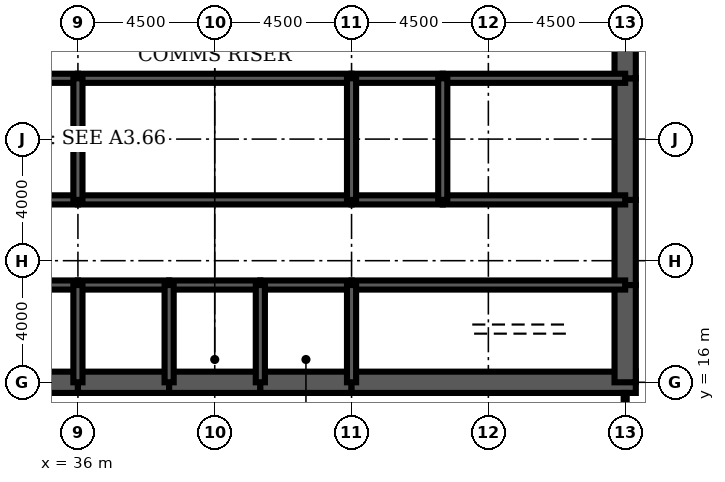
"""IFC4 building model, lengths in metres.
Left out: names, types, materials, properties, quantities, classifications, styles, units other than length and angle.
Written with IfcOpenShell. Run it as: python <this file> out.ifc"""

import sys

from ifc_helpers import new_model, si_unit, direction, frame, frame_2d, origin, place, context, subcontext, project, spatial, rectangle, extrude, element, fill, save


model = new_model("IFC4")
c1 = context("Model", 3, precision=1e-05, world=origin(), true_north=direction((0.0, 1.0)))
c2 = subcontext(c1, "Body", "Model", "MODEL_VIEW")
j1 = project(units=[si_unit("LENGTHUNIT", "METRE"), si_unit("PLANEANGLEUNIT", "RADIAN")], contexts=[c1])
p1 = place(None, origin())
s1 = spatial("IfcSite", under=j1, at=p1, CompositionType="ELEMENT")
p2 = place(p1, origin())
s2 = spatial("IfcBuilding", under=s1, at=p2, CompositionType="ELEMENT")
p3 = place(p2, frame((0.0, 0.0, 283.7)))
s3 = spatial("IfcBuildingStorey", under=s2, at=p3, CompositionType="ELEMENT", Elevation=283.7)
for number, where, z_axis, x_axis in (
    (1, (33.0, 16.0, 0.0), (0.0, 0.0, 1.0), (1.0, 0.0, 0.0)),
    (2, (36.0, 16.0, 0.0), (0.0, 0.0, 1.0), (1.0, 0.0, 0.0)),
    (3, (39.0, 16.0, 0.0), (0.0, 0.0, 1.0), (1.0, 0.0, 0.0)),
    (4, (42.0, 16.0, 0.0), (0.0, 0.0, 1.0), (1.0, 0.0, 0.0)),
):
    element("IfcWall", number, at=place(p3, frame(where, z_axis=z_axis, x_axis=x_axis)), inside=s3, PredefinedType="SHEAR", context=c2, shape_type="SweptSolid", body=[
        extrude(rectangle(XDim=3.0, YDim=0.7, at=frame_2d((1.5, 0.0))), origin(), (0.0, 0.0, 1.0), 4.2),
    ])
p4 = place(p3, frame((45.0, 16.0, 0.0), z_axis=(0.0, 0.0, 1.0), x_axis=(1.0, 0.0, 0.0)))
e5 = element("IfcWall", 5, at=p4, inside=s3, PredefinedType="SHEAR", context=c2, shape_type="SweptSolid", body=[
    extrude(rectangle(XDim=9.35, YDim=0.7, at=frame_2d((4.675, 0.0))), origin(), (0.0, 0.0, 1.0), 4.2),
])
p5 = place(p3, frame((54.0, 16.0, 0.0), z_axis=(0.0, 0.0, 1.0), x_axis=(0.0, 1.0, 0.0)))
e6 = element("IfcWall", 6, at=p5, inside=s3, PredefinedType="SHEAR", context=c2, shape_type="SweptSolid", body=[
    extrude(rectangle(XDim=3.2, YDim=0.7, at=frame_2d((1.6, 0.0))), origin(), (0.0, 0.0, 1.0), 4.2),
])
p6 = place(p3, frame((54.0, 19.2, 0.0), z_axis=(0.0, 0.0, 1.0), x_axis=(0.0, 1.0, 0.0)))
e7 = element("IfcWall", 7, at=p6, inside=s3, PredefinedType="SHEAR", context=c2, shape_type="SweptSolid", body=[
    extrude(rectangle(XDim=2.8, YDim=0.7, at=frame_2d((1.4, 0.0))), origin(), (0.0, 0.0, 1.0), 4.2),
])
p7 = place(p6, frame((0.4, 0.0, 0.0)))
e8 = element("IfcOpeningElement", 8, at=p7, cuts=e7, PredefinedType="OPENING", context=c2, shape_type="SweptSolid", body=[
    extrude(rectangle(XDim=1.8, YDim=2.1, at=frame_2d((0.9, 1.05))), frame((0.0, 0.36, 0.0), z_axis=(0.0, -1.0, 0.0), x_axis=(1.0, 0.0, 0.0)), (0.0, 0.0, 1.0), 0.72),
])
p8 = place(p3, frame((54.0, 22.0, 0.0), z_axis=(0.0, 0.0, 1.0), x_axis=(0.0, 1.0, 0.0)))
e9 = element("IfcWall", 9, at=p8, inside=s3, PredefinedType="SHEAR", context=c2, shape_type="SweptSolid", body=[
    extrude(rectangle(XDim=4.0, YDim=0.7, at=frame_2d((2.0, 0.0))), origin(), (0.0, 0.0, 1.0), 4.2),
])
p9 = place(p3, frame((54.0, 26.0, 0.0), z_axis=(0.0, 0.0, 1.0), x_axis=(0.0, 1.0, 0.0)))
e10 = element("IfcWall", 10, at=p9, inside=s3, PredefinedType="SHEAR", context=c2, shape_type="SweptSolid", body=[
    extrude(rectangle(XDim=2.8, YDim=0.7, at=frame_2d((1.4, 0.0))), origin(), (0.0, 0.0, 1.0), 4.2),
])
p10 = place(p9, frame((0.6, 0.0, 0.0)))
e11 = element("IfcOpeningElement", 11, at=p10, cuts=e10, PredefinedType="OPENING", context=c2, shape_type="SweptSolid", body=[
    extrude(rectangle(XDim=1.8, YDim=2.1, at=frame_2d((0.9, 1.05))), frame((0.0, 0.36, 0.0), z_axis=(0.0, -1.0, 0.0), x_axis=(1.0, 0.0, 0.0)), (0.0, 0.0, 1.0), 0.72),
])
p11 = place(p3, frame((33.0, 19.2, 0.0), z_axis=(0.0, 0.0, 1.0), x_axis=(1.0, 0.0, 0.0)))
e12 = element("IfcWall", 12, at=p11, inside=s3, PredefinedType="SOLIDWALL", context=c2, shape_type="SweptSolid", body=[
    extrude(rectangle(XDim=3.0, YDim=0.3, at=frame_2d((1.5, 0.0))), origin(), (0.0, 0.0, 1.0), 4.2),
])
p12 = place(p11, frame((0.95, 0.0, 0.0)))
e13 = element("IfcOpeningElement", 13, at=p12, cuts=e12, PredefinedType="OPENING", context=c2, shape_type="SweptSolid", body=[
    extrude(rectangle(XDim=1.1, YDim=2.2, at=frame_2d((0.55, 1.1))), frame((0.0, 0.16, 0.0), z_axis=(0.0, -1.0, 0.0), x_axis=(1.0, 0.0, 0.0)), (0.0, 0.0, 1.0), 0.32),
])
p13 = place(p3, frame((36.0, 19.2, 0.0), z_axis=(0.0, 0.0, 1.0), x_axis=(1.0, 0.0, 0.0)))
e14 = element("IfcWall", 14, at=p13, inside=s3, PredefinedType="SOLIDWALL", context=c2, shape_type="SweptSolid", body=[
    extrude(rectangle(XDim=3.0, YDim=0.3, at=frame_2d((1.5, 0.0))), origin(), (0.0, 0.0, 1.0), 4.2),
])
p14 = place(p13, frame((0.95, 0.0, 0.0)))
e15 = element("IfcOpeningElement", 15, at=p14, cuts=e14, PredefinedType="OPENING", context=c2, shape_type="SweptSolid", body=[
    extrude(rectangle(XDim=1.1, YDim=2.2, at=frame_2d((0.55, 1.1))), frame((0.0, 0.16, 0.0), z_axis=(0.0, -1.0, 0.0), x_axis=(1.0, 0.0, 0.0)), (0.0, 0.0, 1.0), 0.32),
])
p15 = place(p3, frame((39.0, 19.2, 0.0), z_axis=(0.0, 0.0, 1.0), x_axis=(1.0, 0.0, 0.0)))
e16 = element("IfcWall", 16, at=p15, inside=s3, PredefinedType="SOLIDWALL", context=c2, shape_type="SweptSolid", body=[
    extrude(rectangle(XDim=3.0, YDim=0.3, at=frame_2d((1.5, 0.0))), origin(), (0.0, 0.0, 1.0), 4.2),
])
p16 = place(p15, frame((1.0, 0.0, 0.0)))
e17 = element("IfcOpeningElement", 17, at=p16, cuts=e16, PredefinedType="OPENING", context=c2, shape_type="SweptSolid", body=[
    extrude(rectangle(XDim=1.0, YDim=2.1, at=frame_2d((0.5, 1.05))), frame((0.0, 0.16, 0.0), z_axis=(0.0, -1.0, 0.0), x_axis=(1.0, 0.0, 0.0)), (0.0, 0.0, 1.0), 0.32),
])
p17 = place(p3, frame((42.0, 19.2, 0.0), z_axis=(0.0, 0.0, 1.0), x_axis=(1.0, 0.0, 0.0)))
e18 = element("IfcWall", 18, at=p17, inside=s3, PredefinedType="SOLIDWALL", context=c2, shape_type="SweptSolid", body=[
    extrude(rectangle(XDim=3.0, YDim=0.3, at=frame_2d((1.5, 0.0))), origin(), (0.0, 0.0, 1.0), 4.2),
])
p18 = place(p17, frame((1.0, 0.0, 0.0)))
e19 = element("IfcOpeningElement", 19, at=p18, cuts=e18, PredefinedType="OPENING", context=c2, shape_type="SweptSolid", body=[
    extrude(rectangle(XDim=1.0, YDim=2.1, at=frame_2d((0.5, 1.05))), frame((0.0, 0.16, 0.0), z_axis=(0.0, -1.0, 0.0), x_axis=(1.0, 0.0, 0.0)), (0.0, 0.0, 1.0), 0.32),
])
p19 = place(p3, frame((45.0, 19.2, 0.0), z_axis=(0.0, 0.0, 1.0), x_axis=(1.0, 0.0, 0.0)))
e20 = element("IfcWall", 20, at=p19, inside=s3, PredefinedType="SOLIDWALL", context=c2, shape_type="SweptSolid", body=[
    extrude(rectangle(XDim=9.0, YDim=0.3, at=frame_2d((4.5, 0.0))), origin(), (0.0, 0.0, 1.0), 4.2),
])
p20 = place(p19, frame((7.35, 0.0, 0.0)))
e21 = element("IfcOpeningElement", 21, at=p20, cuts=e20, PredefinedType="OPENING", context=c2, shape_type="SweptSolid", body=[
    extrude(rectangle(XDim=1.0, YDim=2.1, at=frame_2d((0.5, 1.05))), frame((0.0, 0.16, 0.0), z_axis=(0.0, -1.0, 0.0), x_axis=(1.0, 0.0, 0.0)), (0.0, 0.0, 1.0), 0.32),
])
p21 = place(p3, frame((27.0, 22.0, 0.0), z_axis=(0.0, 0.0, 1.0), x_axis=(1.0, 0.0, 0.0)))
e22 = element("IfcWall", 22, at=p21, inside=s3, PredefinedType="SOLIDWALL", context=c2, shape_type="SweptSolid", body=[
    extrude(rectangle(XDim=9.0, YDim=0.3, at=frame_2d((4.5, 0.0))), origin(), (0.0, 0.0, 1.0), 4.2),
])
p22 = place(p21, frame((4.0, 0.0, 0.0)))
e23 = element("IfcOpeningElement", 23, at=p22, cuts=e22, PredefinedType="OPENING", context=c2, shape_type="SweptSolid", body=[
    extrude(rectangle(XDim=1.0, YDim=2.1, at=frame_2d((0.5, 1.05))), frame((0.0, 0.16, 0.0), z_axis=(0.0, -1.0, 0.0), x_axis=(1.0, 0.0, 0.0)), (0.0, 0.0, 1.0), 0.32),
])
p23 = place(p3, frame((36.0, 22.0, 0.0), z_axis=(0.0, 0.0, 1.0), x_axis=(1.0, 0.0, 0.0)))
e24 = element("IfcWall", 24, at=p23, inside=s3, PredefinedType="SOLIDWALL", context=c2, shape_type="SweptSolid", body=[
    extrude(rectangle(XDim=9.0, YDim=0.3, at=frame_2d((4.5, 0.0))), origin(), (0.0, 0.0, 1.0), 4.2),
])
p24 = place(p23, frame((4.0, 0.0, 0.0)))
e25 = element("IfcOpeningElement", 25, at=p24, cuts=e24, PredefinedType="OPENING", context=c2, shape_type="SweptSolid", body=[
    extrude(rectangle(XDim=1.0, YDim=2.1, at=frame_2d((0.5, 1.05))), frame((0.0, 0.16, 0.0), z_axis=(0.0, -1.0, 0.0), x_axis=(1.0, 0.0, 0.0)), (0.0, 0.0, 1.0), 0.32),
])
p25 = place(p3, frame((45.0, 22.0, 0.0), z_axis=(0.0, 0.0, 1.0), x_axis=(1.0, 0.0, 0.0)))
e26 = element("IfcWall", 26, at=p25, inside=s3, PredefinedType="SOLIDWALL", context=c2, shape_type="SweptSolid", body=[
    extrude(rectangle(XDim=3.0, YDim=0.3, at=frame_2d((1.5, 0.0))), origin(), (0.0, 0.0, 1.0), 4.2),
])
p26 = place(p25, frame((1.0, 0.0, 0.0)))
e27 = element("IfcOpeningElement", 27, at=p26, cuts=e26, PredefinedType="OPENING", context=c2, shape_type="SweptSolid", body=[
    extrude(rectangle(XDim=1.0, YDim=2.1, at=frame_2d((0.5, 1.05))), frame((0.0, 0.16, 0.0), z_axis=(0.0, -1.0, 0.0), x_axis=(1.0, 0.0, 0.0)), (0.0, 0.0, 1.0), 0.32),
])
p27 = place(p3, frame((48.0, 22.0, 0.0), z_axis=(0.0, 0.0, 1.0), x_axis=(1.0, 0.0, 0.0)))
e28 = element("IfcWall", 28, at=p27, inside=s3, PredefinedType="SOLIDWALL", context=c2, shape_type="SweptSolid", body=[
    extrude(rectangle(XDim=6.0, YDim=0.3, at=frame_2d((3.0, 0.0))), origin(), (0.0, 0.0, 1.0), 4.2),
])
p28 = place(p27, frame((2.0, 0.0, 0.0)))
e29 = element("IfcOpeningElement", 29, at=p28, cuts=e28, PredefinedType="OPENING", context=c2, shape_type="SweptSolid", body=[
    extrude(rectangle(XDim=1.0, YDim=2.1, at=frame_2d((0.5, 1.05))), frame((0.0, 0.16, 0.0), z_axis=(0.0, -1.0, 0.0), x_axis=(1.0, 0.0, 0.0)), (0.0, 0.0, 1.0), 0.32),
])
p29 = place(p27, frame((4.4, 0.0, 0.0)))
e30 = element("IfcOpeningElement", 30, at=p29, cuts=e28, PredefinedType="OPENING", context=c2, shape_type="SweptSolid", body=[
    extrude(rectangle(XDim=1.0, YDim=2.1, at=frame_2d((0.5, 1.05))), frame((0.0, 0.16, 0.0), z_axis=(0.0, -1.0, 0.0), x_axis=(1.0, 0.0, 0.0)), (0.0, 0.0, 1.0), 0.32),
])
for number, where, z_axis, x_axis in (
    (31, (27.0, 26.0, 0.0), (0.0, 0.0, 1.0), (1.0, 0.0, 0.0)),
    (32, (36.0, 26.0, 0.0), (0.0, 0.0, 1.0), (1.0, 0.0, 0.0)),
):
    element("IfcWall", number, at=place(p3, frame(where, z_axis=z_axis, x_axis=x_axis)), inside=s3, PredefinedType="SOLIDWALL", context=c2, shape_type="SweptSolid", body=[
        extrude(rectangle(XDim=9.0, YDim=0.3, at=frame_2d((4.5, 0.0))), origin(), (0.0, 0.0, 1.0), 4.2),
    ])
p30 = place(p3, frame((45.0, 26.0, 0.0), z_axis=(0.0, 0.0, 1.0), x_axis=(1.0, 0.0, 0.0)))
e33 = element("IfcWall", 33, at=p30, inside=s3, PredefinedType="SOLIDWALL", context=c2, shape_type="SweptSolid", body=[
    extrude(rectangle(XDim=3.0, YDim=0.3, at=frame_2d((1.5, 0.0))), origin(), (0.0, 0.0, 1.0), 4.2),
])
p31 = place(p3, frame((48.0, 26.0, 0.0), z_axis=(0.0, 0.0, 1.0), x_axis=(1.0, 0.0, 0.0)))
e34 = element("IfcWall", 34, at=p31, inside=s3, PredefinedType="SOLIDWALL", context=c2, shape_type="SweptSolid", body=[
    extrude(rectangle(XDim=6.0, YDim=0.3, at=frame_2d((3.0, 0.0))), origin(), (0.0, 0.0, 1.0), 4.2),
])
for number, where, z_axis, x_axis in (
    (35, (36.0, 16.0, 0.0), (0.0, 0.0, 1.0), (0.0, 1.0, 0.0)),
    (36, (39.0, 16.0, 0.0), (0.0, 0.0, 1.0), (0.0, 1.0, 0.0)),
    (37, (42.0, 16.0, 0.0), (0.0, 0.0, 1.0), (0.0, 1.0, 0.0)),
    (38, (45.0, 16.0, 0.0), (0.0, 0.0, 1.0), (0.0, 1.0, 0.0)),
):
    element("IfcWall", number, at=place(p3, frame(where, z_axis=z_axis, x_axis=x_axis)), inside=s3, PredefinedType="SOLIDWALL", context=c2, shape_type="SweptSolid", body=[
        extrude(rectangle(XDim=3.2, YDim=0.3, at=frame_2d((1.6, 0.0))), origin(), (0.0, 0.0, 1.0), 4.2),
    ])
for number, where, z_axis, x_axis in (
    (39, (36.0, 22.0, 0.0), (0.0, 0.0, 1.0), (0.0, 1.0, 0.0)),
    (40, (45.0, 22.0, 0.0), (0.0, 0.0, 1.0), (0.0, 1.0, 0.0)),
    (41, (48.0, 22.0, 0.0), (0.0, 0.0, 1.0), (0.0, 1.0, 0.0)),
):
    element("IfcWall", number, at=place(p3, frame(where, z_axis=z_axis, x_axis=x_axis)), inside=s3, PredefinedType="SOLIDWALL", context=c2, shape_type="SweptSolid", body=[
        extrude(rectangle(XDim=4.0, YDim=0.3, at=frame_2d((2.0, 0.0))), origin(), (0.0, 0.0, 1.0), 4.2),
    ])
p32 = place(p3, frame((39.15, 17.3, 0.0), z_axis=(0.0, 0.0, 1.0), x_axis=(1.0, 0.0, 0.0)))
e42 = element("IfcWall", 42, at=p32, inside=s3, PredefinedType="SOLIDWALL", context=c2, shape_type="SweptSolid", body=[
    extrude(rectangle(XDim=2.7, YDim=0.3, at=frame_2d((1.35, 0.0))), origin(), (0.0, 0.0, 1.0), 4.04),
])
p33 = place(p32, frame((0.85, 0.0, 0.0)))
e43 = element("IfcOpeningElement", 43, at=p33, cuts=e42, PredefinedType="OPENING", context=c2, shape_type="SweptSolid", body=[
    extrude(rectangle(XDim=1.0, YDim=2.1, at=frame_2d((0.5, 1.05))), frame((0.0, 0.16, 0.0), z_axis=(0.0, -1.0, 0.0), x_axis=(1.0, 0.0, 0.0)), (0.0, 0.0, 1.0), 0.32),
])
p34 = place(p3, frame((42.15, 17.3, 0.0), z_axis=(0.0, 0.0, 1.0), x_axis=(1.0, 0.0, 0.0)))
e44 = element("IfcWall", 44, at=p34, inside=s3, PredefinedType="SOLIDWALL", context=c2, shape_type="SweptSolid", body=[
    extrude(rectangle(XDim=2.7, YDim=0.3, at=frame_2d((1.35, 0.0))), origin(), (0.0, 0.0, 1.0), 4.04),
])
p35 = place(p34, frame((0.85, 0.0, 0.0)))
e45 = element("IfcOpeningElement", 45, at=p35, cuts=e44, PredefinedType="OPENING", context=c2, shape_type="SweptSolid", body=[
    extrude(rectangle(XDim=1.0, YDim=2.1, at=frame_2d((0.5, 1.05))), frame((0.0, 0.16, 0.0), z_axis=(0.0, -1.0, 0.0), x_axis=(1.0, 0.0, 0.0)), (0.0, 0.0, 1.0), 0.32),
])
p36 = place(p3, frame((38.0, 22.15, 0.0), z_axis=(0.0, 0.0, 1.0), x_axis=(0.0, 1.0, 0.0)))
e46 = element("IfcWall", 46, at=p36, inside=s3, PredefinedType="PARTITIONING", context=c2, shape_type="SweptSolid", body=[
    extrude(rectangle(XDim=3.7, YDim=0.15, at=frame_2d((1.85, 0.0))), origin(), (0.0, 0.0, 1.0), 3.0),
])
p37 = place(p36, frame((2.2, 0.0, 0.0)))
e47 = element("IfcOpeningElement", 47, at=p37, cuts=e46, PredefinedType="OPENING", context=c2, shape_type="SweptSolid", body=[
    extrude(rectangle(XDim=1.0, YDim=2.1, at=frame_2d((0.5, 1.05))), frame((0.0, 0.085, 0.0), z_axis=(0.0, -1.0, 0.0), x_axis=(1.0, 0.0, 0.0)), (0.0, 0.0, 1.0), 0.17),
])
p38 = place(p3, frame((52.075, 22.15, 0.0), z_axis=(0.0, 0.0, 1.0), x_axis=(0.0, 1.0, 0.0)))
e48 = element("IfcWall", 48, at=p38, inside=s3, PredefinedType="PARTITIONING", context=c2, shape_type="SweptSolid", body=[
    extrude(rectangle(XDim=3.7, YDim=0.15, at=frame_2d((1.85, 0.0))), origin(), (0.0, 0.0, 1.0), 3.0),
])
p39 = place(p3, frame((47.7, 19.35, 0.0), z_axis=(0.0, 0.0, 1.0), x_axis=(0.0, 1.0, 0.0)))
e49 = element("IfcWall", 49, at=p39, inside=s3, PredefinedType="PARTITIONING", context=c2, shape_type="SweptSolid", body=[
    extrude(rectangle(XDim=2.5, YDim=0.15, at=frame_2d((1.25, 0.0))), origin(), (0.0, 0.0, 1.0), 3.0),
])
p40 = place(p39, frame((1.15, 0.0, 0.0)))
e50 = element("IfcOpeningElement", 50, at=p40, cuts=e49, PredefinedType="OPENING", context=c2, shape_type="SweptSolid", body=[
    extrude(rectangle(XDim=1.0, YDim=2.1, at=frame_2d((0.5, 1.05))), frame((0.0, 0.085, 0.0), z_axis=(0.0, -1.0, 0.0), x_axis=(1.0, 0.0, 0.0)), (0.0, 0.0, 1.0), 0.17),
])
p41 = place(p3, frame((54.0, 6.95, 0.0), z_axis=(0.0, 0.0, 1.0), x_axis=(0.0, 1.0, 0.0)))
e51 = element("IfcWall", 51, at=p41, inside=s3, PredefinedType="PARTITIONING", context=c2, shape_type="SweptSolid", body=[
    extrude(rectangle(XDim=8.7, YDim=0.1, at=frame_2d((4.35, 0.0))), origin(), (0.0, 0.0, 1.0), 3.0),
])
p42 = place(p41, frame((3.55, 0.0, 0.0)))
e52 = element("IfcOpeningElement", 52, at=p42, cuts=e51, PredefinedType="OPENING", context=c2, shape_type="SweptSolid", body=[
    extrude(rectangle(XDim=1.6, YDim=2.1, at=frame_2d((0.8, 1.05))), frame((0.0, 0.06, 0.0), z_axis=(0.0, -1.0, 0.0), x_axis=(1.0, 0.0, 0.0)), (0.0, 0.0, 1.0), 0.12),
])
p43 = place(p33, origin())
e53 = element("IfcDoor", 53, at=p43, inside=s3, OperationType="SINGLE_SWING_LEFT", PredefinedType="DOOR", context=c2, shape_type="SweptSolid", body=[
    extrude(rectangle(XDim=1.0, YDim=2.1, at=frame_2d((0.5, 1.05))), frame((0.0, 0.025, 0.0), z_axis=(0.0, -1.0, 0.0), x_axis=(1.0, 0.0, 0.0)), (0.0, 0.0, 1.0), 0.05),
])
fill(e43, e53)
p44 = place(p35, origin())
e54 = element("IfcDoor", 54, at=p44, inside=s3, OperationType="SINGLE_SWING_LEFT", PredefinedType="DOOR", context=c2, shape_type="SweptSolid", body=[
    extrude(rectangle(XDim=1.0, YDim=2.1, at=frame_2d((0.5, 1.05))), frame((0.0, 0.025, 0.0), z_axis=(0.0, -1.0, 0.0), x_axis=(1.0, 0.0, 0.0)), (0.0, 0.0, 1.0), 0.05),
])
fill(e45, e54)
p45 = place(p37, origin())
e55 = element("IfcDoor", 55, at=p45, inside=s3, OperationType="SINGLE_SWING_RIGHT", PredefinedType="DOOR", context=c2, shape_type="SweptSolid", body=[
    extrude(rectangle(XDim=1.0, YDim=2.1, at=frame_2d((0.5, 1.05))), frame((0.0, 0.025, 0.0), z_axis=(0.0, -1.0, 0.0), x_axis=(1.0, 0.0, 0.0)), (0.0, 0.0, 1.0), 0.05),
])
fill(e47, e55)
p46 = place(p40, origin())
e56 = element("IfcDoor", 56, at=p46, inside=s3, OperationType="SINGLE_SWING_RIGHT", PredefinedType="DOOR", context=c2, shape_type="SweptSolid", body=[
    extrude(rectangle(XDim=1.0, YDim=2.1, at=frame_2d((0.5, 1.05))), frame((0.0, 0.025, 0.0), z_axis=(0.0, -1.0, 0.0), x_axis=(1.0, 0.0, 0.0)), (0.0, 0.0, 1.0), 0.05),
])
fill(e50, e56)
p47 = place(p14, origin())
e57 = element("IfcDoor", 57, at=p47, inside=s3, OperationType="DOUBLE_DOOR_SLIDING", PredefinedType="USERDEFINED", context=c2, shape_type="SweptSolid", body=[
    extrude(rectangle(XDim=1.1, YDim=2.2, at=frame_2d((0.55, 1.1))), frame((0.0, 0.025, 0.0), z_axis=(0.0, -1.0, 0.0), x_axis=(1.0, 0.0, 0.0)), (0.0, 0.0, 1.0), 0.05),
])
fill(e15, e57)
p48 = place(p20, origin())
e58 = element("IfcDoor", 58, at=p48, inside=s3, OperationType="SINGLE_SWING_RIGHT", PredefinedType="DOOR", context=c2, shape_type="SweptSolid", body=[
    extrude(rectangle(XDim=1.0, YDim=2.1, at=frame_2d((0.5, 1.05))), frame((0.0, 0.025, 0.0), z_axis=(0.0, -1.0, 0.0), x_axis=(1.0, 0.0, 0.0)), (0.0, 0.0, 1.0), 0.05),
])
fill(e21, e58)
p49 = place(p7, origin())
e59 = element("IfcDoor", 59, at=p49, inside=s3, OperationType="SINGLE_SWING_LEFT", PredefinedType="DOOR", context=c2, shape_type="SweptSolid", body=[
    extrude(rectangle(XDim=1.8, YDim=2.1, at=frame_2d((0.9, 1.05))), frame((0.0, 0.35, 0.0), z_axis=(0.0, -1.0, 0.0), x_axis=(1.0, 0.0, 0.0)), (0.0, 0.0, 1.0), 0.699),
])
fill(e8, e59)
p50 = place(p10, origin())
e60 = element("IfcDoor", 60, at=p50, inside=s3, OperationType="SINGLE_SWING_LEFT", PredefinedType="DOOR", context=c2, shape_type="SweptSolid", body=[
    extrude(rectangle(XDim=1.8, YDim=2.1, at=frame_2d((0.9, 1.05))), frame((0.0, 0.35, 0.0), z_axis=(0.0, -1.0, 0.0), x_axis=(1.0, 0.0, 0.0)), (0.0, 0.0, 1.0), 0.699),
])
fill(e11, e60)
p51 = place(p24, origin())
e61 = element("IfcDoor", 61, at=p51, inside=s3, OperationType="SINGLE_SWING_LEFT", PredefinedType="DOOR", context=c2, shape_type="SweptSolid", body=[
    extrude(rectangle(XDim=1.0, YDim=2.1, at=frame_2d((0.5, 1.05))), frame((0.0, 0.025, 0.0), z_axis=(0.0, -1.0, 0.0), x_axis=(1.0, 0.0, 0.0)), (0.0, 0.0, 1.0), 0.05),
])
fill(e25, e61)
p52 = place(p26, origin())
e62 = element("IfcDoor", 62, at=p52, inside=s3, OperationType="SINGLE_SWING_LEFT", PredefinedType="DOOR", context=c2, shape_type="SweptSolid", body=[
    extrude(rectangle(XDim=1.0, YDim=2.1, at=frame_2d((0.5, 1.05))), frame((0.0, 0.025, 0.0), z_axis=(0.0, -1.0, 0.0), x_axis=(1.0, 0.0, 0.0)), (0.0, 0.0, 1.0), 0.05),
])
fill(e27, e62)
p53 = place(p28, origin())
e63 = element("IfcDoor", 63, at=p53, inside=s3, OperationType="SINGLE_SWING_LEFT", PredefinedType="DOOR", context=c2, shape_type="SweptSolid", body=[
    extrude(rectangle(XDim=1.0, YDim=2.1, at=frame_2d((0.5, 1.05))), frame((0.0, 0.025, 0.0), z_axis=(0.0, -1.0, 0.0), x_axis=(1.0, 0.0, 0.0)), (0.0, 0.0, 1.0), 0.05),
])
fill(e29, e63)
p54 = place(p29, origin())
e64 = element("IfcDoor", 64, at=p54, inside=s3, OperationType="SINGLE_SWING_RIGHT", PredefinedType="DOOR", context=c2, shape_type="SweptSolid", body=[
    extrude(rectangle(XDim=1.0, YDim=2.1, at=frame_2d((0.5, 1.05))), frame((0.0, 0.025, 0.0), z_axis=(0.0, -1.0, 0.0), x_axis=(1.0, 0.0, 0.0)), (0.0, 0.0, 1.0), 0.05),
])
fill(e30, e64)
p55 = place(p16, origin())
e65 = element("IfcDoor", 65, at=p55, inside=s3, OperationType="SINGLE_SWING_LEFT", PredefinedType="DOOR", context=c2, shape_type="SweptSolid", body=[
    extrude(rectangle(XDim=1.0, YDim=2.1, at=frame_2d((0.5, 1.05))), frame((0.0, 0.025, 0.0), z_axis=(0.0, -1.0, 0.0), x_axis=(1.0, 0.0, 0.0)), (0.0, 0.0, 1.0), 0.05),
])
fill(e17, e65)
p56 = place(p18, origin())
e66 = element("IfcDoor", 66, at=p56, inside=s3, OperationType="SINGLE_SWING_LEFT", PredefinedType="DOOR", context=c2, shape_type="SweptSolid", body=[
    extrude(rectangle(XDim=1.0, YDim=2.1, at=frame_2d((0.5, 1.05))), frame((0.0, 0.025, 0.0), z_axis=(0.0, -1.0, 0.0), x_axis=(1.0, 0.0, 0.0)), (0.0, 0.0, 1.0), 0.05),
])
fill(e19, e66)
save(model, sys.argv[1])
